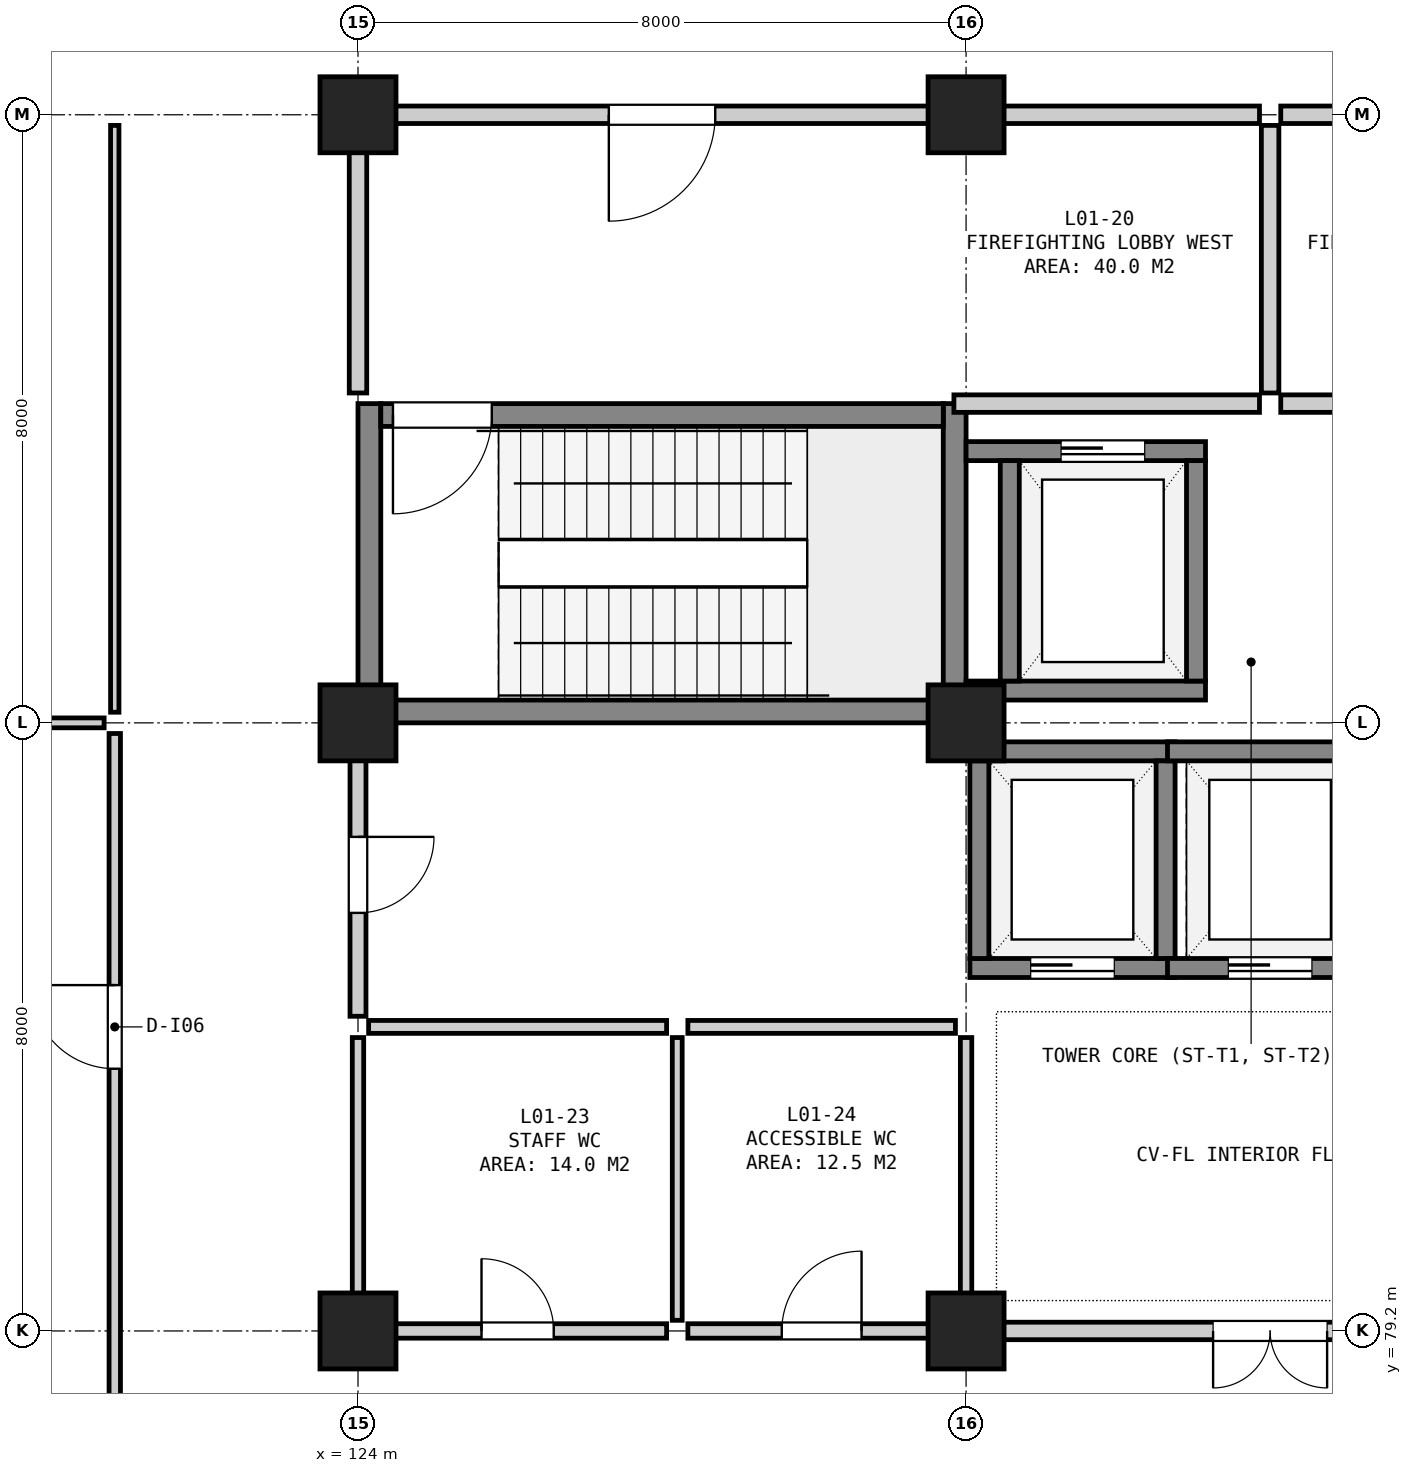
"""IFC4 building model, lengths in metres.
Left out: names, types, materials, properties, quantities, classifications, styles, units other than length and angle.
Written with IfcOpenShell. Run it as: python <this file> out.ifc"""

import sys

from ifc_helpers import new_model, si_unit, direction, frame, frame_2d, origin, origin_2d, place, context, subcontext, project, spatial, rectangle, extrude, element, fill, save


model = new_model("IFC4")
c1 = context("Model", 3, precision=1e-05, world=origin(), true_north=direction((0.0, 1.0)))
c2 = subcontext(c1, "Body", "Model", "MODEL_VIEW")
j1 = project(units=[si_unit("LENGTHUNIT", "METRE"), si_unit("PLANEANGLEUNIT", "RADIAN")], contexts=[c1])
p1 = place(None, origin())
s1 = spatial("IfcSite", under=j1, at=p1, CompositionType="ELEMENT")
p2 = place(p1, origin())
s2 = spatial("IfcBuilding", under=s1, at=p2, CompositionType="ELEMENT")
p3 = place(p2, frame((0.0, 0.0, 5.4)))
s3 = spatial("IfcBuildingStorey", under=s2, at=p3, CompositionType="ELEMENT", Elevation=5.4)
for number, where, z_axis, x_axis in (
    (1, (124.0, 79.2, 0.0), (0.0, 0.0, 1.0), (1.0, 0.0, 0.0)),
    (2, (124.0, 87.2, 0.0), (0.0, 0.0, 1.0), (1.0, 0.0, 0.0)),
    (3, (124.0, 95.2, 0.0), (0.0, 0.0, 1.0), (1.0, 0.0, 0.0)),
    (4, (132.0, 79.2, 0.0), (0.0, 0.0, 1.0), (1.0, 0.0, 0.0)),
    (5, (132.0, 87.2, 0.0), (0.0, 0.0, 1.0), (1.0, 0.0, 0.0)),
    (6, (132.0, 95.2, 0.0), (0.0, 0.0, 1.0), (1.0, 0.0, 0.0)),
):
    element("IfcColumn", number, at=place(p3, frame(where, z_axis=z_axis, x_axis=x_axis)), inside=s3, PredefinedType="COLUMN", context=c2, shape_type="SweptSolid", body=[
        extrude(rectangle(XDim=1.0, YDim=1.0, at=origin_2d()), origin(), (0.0, 0.0, 1.0), 5.4),
    ])
for number, where, z_axis, x_axis in (
    (7, (124.15, 87.2, 0.0), (0.0, 0.0, 1.0), (0.0, 1.0, 0.0)),
    (8, (131.85, 87.2, 0.0), (0.0, 0.0, 1.0), (0.0, 1.0, 0.0)),
):
    element("IfcWall", number, at=place(p3, frame(where, z_axis=z_axis, x_axis=x_axis)), inside=s3, PredefinedType="SHEAR", context=c2, shape_type="SweptSolid", body=[
        extrude(rectangle(XDim=4.2, YDim=0.3, at=frame_2d((2.1, 0.0))), origin(), (0.0, 0.0, 1.0), 5.1),
    ])
p4 = place(p3, frame((124.3, 87.35, 0.0), z_axis=(0.0, 0.0, 1.0), x_axis=(1.0, 0.0, 0.0)))
e9 = element("IfcWall", 9, at=p4, inside=s3, PredefinedType="SHEAR", context=c2, shape_type="SweptSolid", body=[
    extrude(rectangle(XDim=7.4, YDim=0.3, at=frame_2d((3.7, 0.0))), origin(), (0.0, 0.0, 1.0), 5.1),
])
p5 = place(p3, frame((124.3, 91.25, 0.0), z_axis=(0.0, 0.0, 1.0), x_axis=(1.0, 0.0, 0.0)))
e10 = element("IfcWall", 10, at=p5, inside=s3, PredefinedType="SHEAR", context=c2, shape_type="SweptSolid", body=[
    extrude(rectangle(XDim=7.4, YDim=0.3, at=frame_2d((3.7, 0.0))), origin(), (0.0, 0.0, 1.0), 5.1),
])
p6 = place(p5, frame((0.16, 0.0, 0.0)))
e11 = element("IfcOpeningElement", 11, at=p6, cuts=e10, PredefinedType="OPENING", context=c2, shape_type="SweptSolid", body=[
    extrude(rectangle(XDim=1.3, YDim=2.18, at=frame_2d((0.65, 1.09))), frame((0.0, 0.162, 0.0), z_axis=(0.0, -1.0, 0.0), x_axis=(1.0, 0.0, 0.0)), (0.0, 0.0, 1.0), 0.324),
])
p7 = place(p3, frame((132.0, 87.625, 0.0), z_axis=(0.0, 0.0, 1.0), x_axis=(1.0, 0.0, 0.0)))
e12 = element("IfcWall", 12, at=p7, inside=s3, PredefinedType="SHEAR", context=c2, shape_type="SweptSolid", body=[
    extrude(rectangle(XDim=3.15, YDim=0.25, at=frame_2d((1.575, 0.0))), origin(), (0.0, 0.0, 1.0), 5.1),
])
p8 = place(p3, frame((132.0, 90.775, 0.0), z_axis=(0.0, 0.0, 1.0), x_axis=(1.0, 0.0, 0.0)))
e13 = element("IfcWall", 13, at=p8, inside=s3, PredefinedType="SHEAR", context=c2, shape_type="SweptSolid", body=[
    extrude(rectangle(XDim=3.15, YDim=0.25, at=frame_2d((1.575, 0.0))), origin(), (0.0, 0.0, 1.0), 5.1),
])
p9 = place(p8, frame((1.25, 0.0, 0.0)))
e14 = element("IfcOpeningElement", 14, at=p9, cuts=e13, PredefinedType="OPENING", context=c2, shape_type="SweptSolid", body=[
    extrude(rectangle(XDim=1.1, YDim=2.15, at=frame_2d((0.55, 1.075))), frame((0.0, 0.137, 0.0), z_axis=(0.0, -1.0, 0.0), x_axis=(1.0, 0.0, 0.0)), (0.0, 0.0, 1.0), 0.274),
])
for number, where, z_axis, x_axis in (
    (15, (132.575, 87.75, 0.0), (0.0, 0.0, 1.0), (0.0, 1.0, 0.0)),
    (16, (135.025, 87.75, 0.0), (0.0, 0.0, 1.0), (0.0, 1.0, 0.0)),
):
    element("IfcWall", number, at=place(p3, frame(where, z_axis=z_axis, x_axis=x_axis)), inside=s3, PredefinedType="SHEAR", context=c2, shape_type="SweptSolid", body=[
        extrude(rectangle(XDim=2.9, YDim=0.25, at=frame_2d((1.45, 0.0))), origin(), (0.0, 0.0, 1.0), 5.1),
    ])
p10 = place(p3, frame((132.05, 83.975, 0.0), z_axis=(0.0, 0.0, 1.0), x_axis=(1.0, 0.0, 0.0)))
e17 = element("IfcWall", 17, at=p10, inside=s3, PredefinedType="SHEAR", context=c2, shape_type="SweptSolid", body=[
    extrude(rectangle(XDim=2.7, YDim=0.25, at=frame_2d((1.35, 0.0))), origin(), (0.0, 0.0, 1.0), 5.1),
])
p11 = place(p10, frame((0.8, 0.0, 0.0)))
e18 = element("IfcOpeningElement", 18, at=p11, cuts=e17, PredefinedType="OPENING", context=c2, shape_type="SweptSolid", body=[
    extrude(rectangle(XDim=1.1, YDim=2.15, at=frame_2d((0.55, 1.075))), frame((0.0, 0.137, 0.0), z_axis=(0.0, -1.0, 0.0), x_axis=(1.0, 0.0, 0.0)), (0.0, 0.0, 1.0), 0.274),
])
p12 = place(p3, frame((132.05, 86.825, 0.0), z_axis=(0.0, 0.0, 1.0), x_axis=(1.0, 0.0, 0.0)))
e19 = element("IfcWall", 19, at=p12, inside=s3, PredefinedType="SHEAR", context=c2, shape_type="SweptSolid", body=[
    extrude(rectangle(XDim=2.7, YDim=0.25, at=frame_2d((1.35, 0.0))), origin(), (0.0, 0.0, 1.0), 5.1),
])
for number, where, z_axis, x_axis in (
    (20, (132.175, 84.1, 0.0), (0.0, 0.0, 1.0), (0.0, 1.0, 0.0)),
    (21, (134.625, 84.1, 0.0), (0.0, 0.0, 1.0), (0.0, 1.0, 0.0)),
):
    element("IfcWall", number, at=place(p3, frame(where, z_axis=z_axis, x_axis=x_axis)), inside=s3, PredefinedType="SHEAR", context=c2, shape_type="SweptSolid", body=[
        extrude(rectangle(XDim=2.6, YDim=0.25, at=frame_2d((1.3, 0.0))), origin(), (0.0, 0.0, 1.0), 5.1),
    ])
p13 = place(p3, frame((134.65, 83.975, 0.0), z_axis=(0.0, 0.0, 1.0), x_axis=(1.0, 0.0, 0.0)))
e22 = element("IfcWall", 22, at=p13, inside=s3, PredefinedType="SHEAR", context=c2, shape_type="SweptSolid", body=[
    extrude(rectangle(XDim=2.7, YDim=0.25, at=frame_2d((1.35, 0.0))), origin(), (0.0, 0.0, 1.0), 5.1),
])
p14 = place(p13, frame((0.8, 0.0, 0.0)))
e23 = element("IfcOpeningElement", 23, at=p14, cuts=e22, PredefinedType="OPENING", context=c2, shape_type="SweptSolid", body=[
    extrude(rectangle(XDim=1.1, YDim=2.15, at=frame_2d((0.55, 1.075))), frame((0.0, 0.137, 0.0), z_axis=(0.0, -1.0, 0.0), x_axis=(1.0, 0.0, 0.0)), (0.0, 0.0, 1.0), 0.274),
])
p15 = place(p3, frame((134.65, 86.825, 0.0), z_axis=(0.0, 0.0, 1.0), x_axis=(1.0, 0.0, 0.0)))
e24 = element("IfcWall", 24, at=p15, inside=s3, PredefinedType="SHEAR", context=c2, shape_type="SweptSolid", body=[
    extrude(rectangle(XDim=2.7, YDim=0.25, at=frame_2d((1.35, 0.0))), origin(), (0.0, 0.0, 1.0), 5.1),
])
p16 = place(p3, frame((131.84, 91.4, 0.0), z_axis=(0.0, 0.0, 1.0), x_axis=(1.0, 0.0, 0.0)))
e25 = element("IfcWall", 25, at=p16, inside=s3, PredefinedType="SOLIDWALL", context=c2, shape_type="SweptSolid", body=[
    extrude(rectangle(XDim=4.02, YDim=0.23, at=frame_2d((2.01, 0.0))), origin(), (0.0, 0.0, 1.0), 5.1),
])
p17 = place(p3, frame((124.14, 95.2, 0.0), z_axis=(0.0, 0.0, 1.0), x_axis=(1.0, 0.0, 0.0)))
e26 = element("IfcWall", 26, at=p17, inside=s3, PredefinedType="SOLIDWALL", context=c2, shape_type="SweptSolid", body=[
    extrude(rectangle(XDim=11.72, YDim=0.23, at=frame_2d((5.86, 0.0))), origin(), (0.0, 0.0, 1.0), 4.535),
])
p18 = place(p17, frame((3.16, 0.0, 0.0)))
e27 = element("IfcOpeningElement", 27, at=p18, cuts=e26, PredefinedType="OPENING", context=c2, shape_type="SweptSolid", body=[
    extrude(rectangle(XDim=1.4, YDim=2.2, at=frame_2d((0.7, 1.1))), frame((0.0, 0.127, 0.0), z_axis=(0.0, -1.0, 0.0), x_axis=(1.0, 0.0, 0.0)), (0.0, 0.0, 1.0), 0.254),
])
p19 = place(p3, frame((124.0, 91.54, 0.0), z_axis=(0.0, 0.0, 1.0), x_axis=(0.0, 1.0, 0.0)))
e28 = element("IfcWall", 28, at=p19, inside=s3, PredefinedType="SOLIDWALL", context=c2, shape_type="SweptSolid", body=[
    extrude(rectangle(XDim=3.52, YDim=0.23, at=frame_2d((1.76, 0.0))), origin(), (0.0, 0.0, 1.0), 4.585),
])
p20 = place(p3, frame((136.0, 91.54, 0.0), z_axis=(0.0, 0.0, 1.0), x_axis=(0.0, 1.0, 0.0)))
e29 = element("IfcWall", 29, at=p20, inside=s3, PredefinedType="SOLIDWALL", context=c2, shape_type="SweptSolid", body=[
    extrude(rectangle(XDim=3.52, YDim=0.23, at=frame_2d((1.76, 0.0))), origin(), (0.0, 0.0, 1.0), 5.1),
])
p21 = place(p3, frame((136.14, 91.4, 0.0), z_axis=(0.0, 0.0, 1.0), x_axis=(1.0, 0.0, 0.0)))
e30 = element("IfcWall", 30, at=p21, inside=s3, PredefinedType="SOLIDWALL", context=c2, shape_type="SweptSolid", body=[
    extrude(rectangle(XDim=4.02, YDim=0.23, at=frame_2d((2.01, 0.0))), origin(), (0.0, 0.0, 1.0), 5.1),
])
p22 = place(p3, frame((136.14, 95.2, 0.0), z_axis=(0.0, 0.0, 1.0), x_axis=(1.0, 0.0, 0.0)))
e31 = element("IfcWall", 31, at=p22, inside=s3, PredefinedType="SOLIDWALL", context=c2, shape_type="SweptSolid", body=[
    extrude(rectangle(XDim=11.72, YDim=0.23, at=frame_2d((5.86, 0.0))), origin(), (0.0, 0.0, 1.0), 4.535),
])
p23 = place(p22, frame((7.16, 0.0, 0.0)))
e32 = element("IfcOpeningElement", 32, at=p23, cuts=e31, PredefinedType="OPENING", context=c2, shape_type="SweptSolid", body=[
    extrude(rectangle(XDim=1.4, YDim=2.2, at=frame_2d((0.7, 1.1))), frame((0.0, 0.127, 0.0), z_axis=(0.0, -1.0, 0.0), x_axis=(1.0, 0.0, 0.0)), (0.0, 0.0, 1.0), 0.254),
])
p24 = place(p3, frame((124.14, 79.2, 0.0), z_axis=(0.0, 0.0, 1.0), x_axis=(1.0, 0.0, 0.0)))
e33 = element("IfcWall", 33, at=p24, inside=s3, PredefinedType="PARTITIONING", context=c2, shape_type="SweptSolid", body=[
    extrude(rectangle(XDim=3.92, YDim=0.19, at=frame_2d((1.96, 0.0))), origin(), (0.0, 0.0, 1.0), 4.435),
])
p25 = place(p24, frame((1.485, 0.0, 0.0)))
e34 = element("IfcOpeningElement", 34, at=p25, cuts=e33, PredefinedType="OPENING", context=c2, shape_type="SweptSolid", body=[
    extrude(rectangle(XDim=0.95, YDim=2.15, at=frame_2d((0.475, 1.075))), frame((0.0, 0.107, 0.0), z_axis=(0.0, -1.0, 0.0), x_axis=(1.0, 0.0, 0.0)), (0.0, 0.0, 1.0), 0.214),
])
p26 = place(p3, frame((124.14, 83.2, 0.0), z_axis=(0.0, 0.0, 1.0), x_axis=(1.0, 0.0, 0.0)))
e35 = element("IfcWall", 35, at=p26, inside=s3, PredefinedType="PARTITIONING", context=c2, shape_type="SweptSolid", body=[
    extrude(rectangle(XDim=3.92, YDim=0.17, at=frame_2d((1.96, 0.0))), origin(), (0.0, 0.0, 1.0), 5.1),
])
p27 = place(p3, frame((124.0, 79.34, 0.0), z_axis=(0.0, 0.0, 1.0), x_axis=(0.0, 1.0, 0.0)))
e36 = element("IfcWall", 36, at=p27, inside=s3, PredefinedType="PARTITIONING", context=c2, shape_type="SweptSolid", body=[
    extrude(rectangle(XDim=3.72, YDim=0.15, at=frame_2d((1.86, 0.0))), origin(), (0.0, 0.0, 1.0), 4.535),
])
p28 = place(p3, frame((128.2, 79.34, 0.0), z_axis=(0.0, 0.0, 1.0), x_axis=(0.0, 1.0, 0.0)))
e37 = element("IfcWall", 37, at=p28, inside=s3, PredefinedType="PARTITIONING", context=c2, shape_type="SweptSolid", body=[
    extrude(rectangle(XDim=3.72, YDim=0.13, at=frame_2d((1.86, 0.0))), origin(), (0.0, 0.0, 1.0), 5.1),
])
p29 = place(p3, frame((128.34, 79.2, 0.0), z_axis=(0.0, 0.0, 1.0), x_axis=(1.0, 0.0, 0.0)))
e38 = element("IfcWall", 38, at=p29, inside=s3, PredefinedType="PARTITIONING", context=c2, shape_type="SweptSolid", body=[
    extrude(rectangle(XDim=3.52, YDim=0.19, at=frame_2d((1.76, 0.0))), origin(), (0.0, 0.0, 1.0), 4.435),
])
p30 = place(p29, frame((1.235, 0.0, 0.0)))
e39 = element("IfcOpeningElement", 39, at=p30, cuts=e38, PredefinedType="OPENING", context=c2, shape_type="SweptSolid", body=[
    extrude(rectangle(XDim=1.05, YDim=2.15, at=frame_2d((0.525, 1.075))), frame((0.0, 0.107, 0.0), z_axis=(0.0, -1.0, 0.0), x_axis=(1.0, 0.0, 0.0)), (0.0, 0.0, 1.0), 0.214),
])
p31 = place(p3, frame((128.34, 83.2, 0.0), z_axis=(0.0, 0.0, 1.0), x_axis=(1.0, 0.0, 0.0)))
e40 = element("IfcWall", 40, at=p31, inside=s3, PredefinedType="PARTITIONING", context=c2, shape_type="SweptSolid", body=[
    extrude(rectangle(XDim=3.52, YDim=0.17, at=frame_2d((1.76, 0.0))), origin(), (0.0, 0.0, 1.0), 5.1),
])
p32 = place(p3, frame((132.0, 79.34, 0.0), z_axis=(0.0, 0.0, 1.0), x_axis=(0.0, 1.0, 0.0)))
e41 = element("IfcWall", 41, at=p32, inside=s3, PredefinedType="PARTITIONING", context=c2, shape_type="SweptSolid", body=[
    extrude(rectangle(XDim=3.72, YDim=0.15, at=frame_2d((1.86, 0.0))), origin(), (0.0, 0.0, 1.0), 4.485),
])
p33 = place(p3, frame((124.0, 83.34, 0.0), z_axis=(0.0, 0.0, 1.0), x_axis=(0.0, 1.0, 0.0)))
e42 = element("IfcWall", 42, at=p33, inside=s3, PredefinedType="SOLIDWALL", context=c2, shape_type="SweptSolid", body=[
    extrude(rectangle(XDim=3.72, YDim=0.21, at=frame_2d((1.86, 0.0))), origin(), (0.0, 0.0, 1.0), 4.535),
])
p34 = place(p33, frame((1.36, 0.0, 0.0)))
e43 = element("IfcOpeningElement", 43, at=p34, cuts=e42, PredefinedType="OPENING", context=c2, shape_type="SweptSolid", body=[
    extrude(rectangle(XDim=1.0, YDim=2.15, at=frame_2d((0.5, 1.075))), frame((0.0, 0.117, 0.0), z_axis=(0.0, -1.0, 0.0), x_axis=(1.0, 0.0, 0.0)), (0.0, 0.0, 1.0), 0.234),
])
p35 = place(p3, frame((132.14, 79.2, 0.0), z_axis=(0.0, 0.0, 1.0), x_axis=(1.0, 0.0, 0.0)))
e44 = element("IfcWall", 44, at=p35, inside=s3, PredefinedType="SOLIDWALL", context=c2, shape_type="SweptSolid", body=[
    extrude(rectangle(XDim=7.72, YDim=0.23, at=frame_2d((3.86, 0.0))), origin(), (0.0, 0.0, 1.0), 4.485),
])
p36 = place(p35, frame((3.11, 0.0, 0.0)))
e45 = element("IfcOpeningElement", 45, at=p36, cuts=e44, PredefinedType="OPENING", context=c2, shape_type="SweptSolid", body=[
    extrude(rectangle(XDim=1.5, YDim=2.2, at=frame_2d((0.75, 1.1))), frame((0.0, 0.127, 0.0), z_axis=(0.0, -1.0, 0.0), x_axis=(1.0, 0.0, 0.0)), (0.0, 0.0, 1.0), 0.254),
])
p37 = place(p3, frame((102.24, 87.2, 0.0), z_axis=(0.0, 0.0, 1.0), x_axis=(1.0, 0.0, 0.0)))
e46 = element("IfcWall", 46, at=p37, inside=s3, PredefinedType="PARTITIONING", context=c2, shape_type="SweptSolid", body=[
    extrude(rectangle(XDim=18.42, YDim=0.13, at=frame_2d((9.21, 0.0))), origin(), (0.0, 0.0, 1.0), 4.435),
])
p38 = place(p37, frame((12.21, 0.0, 0.0)))
e47 = element("IfcOpeningElement", 47, at=p38, cuts=e46, PredefinedType="OPENING", context=c2, shape_type="SweptSolid", body=[
    extrude(rectangle(XDim=1.5, YDim=2.2, at=frame_2d((0.75, 1.1))), frame((0.0, 0.077, 0.0), z_axis=(0.0, -1.0, 0.0), x_axis=(1.0, 0.0, 0.0)), (0.0, 0.0, 1.0), 0.154),
])
p39 = place(p3, frame((120.8, 87.34, 0.0), z_axis=(0.0, 0.0, 1.0), x_axis=(0.0, 1.0, 0.0)))
e48 = element("IfcWall", 48, at=p39, inside=s3, PredefinedType="PARTITIONING", context=c2, shape_type="SweptSolid", body=[
    extrude(rectangle(XDim=7.72, YDim=0.11, at=frame_2d((3.86, 0.0))), origin(), (0.0, 0.0, 1.0), 5.1),
])
p40 = place(p3, frame((120.8, 72.14, 0.0), z_axis=(0.0, 0.0, 1.0), x_axis=(0.0, 1.0, 0.0)))
e49 = element("IfcWall", 49, at=p40, inside=s3, PredefinedType="PARTITIONING", context=c2, shape_type="SweptSolid", body=[
    extrude(rectangle(XDim=14.92, YDim=0.15, at=frame_2d((7.46, 0.0))), origin(), (0.0, 0.0, 1.0), 5.1),
])
p41 = place(p40, frame((10.51, 0.0, 0.0)))
e50 = element("IfcOpeningElement", 50, at=p41, cuts=e49, PredefinedType="OPENING", context=c2, shape_type="SweptSolid", body=[
    extrude(rectangle(XDim=1.1, YDim=2.15, at=frame_2d((0.55, 1.075))), frame((0.0, 0.087, 0.0), z_axis=(0.0, -1.0, 0.0), x_axis=(1.0, 0.0, 0.0)), (0.0, 0.0, 1.0), 0.174),
])
p42 = place(p6, frame((1.3, 0.0, 0.0), z_axis=(0.0, 0.0, 1.0), x_axis=(-1.0, 0.0, 0.0)))
e51 = element("IfcDoor", 51, at=p42, inside=s3, OperationType="SINGLE_SWING_RIGHT", PredefinedType="DOOR", context=c2, shape_type="SweptSolid", body=[
    extrude(rectangle(XDim=1.3, YDim=2.18, at=frame_2d((0.65, 1.09))), frame((0.0, 0.025, 0.0), z_axis=(0.0, -1.0, 0.0), x_axis=(1.0, 0.0, 0.0)), (0.0, 0.0, 1.0), 0.05),
])
fill(e11, e51)
p43 = place(p9, origin())
e52 = element("IfcDoor", 52, at=p43, inside=s3, OperationType="SLIDING_TO_LEFT", PredefinedType="DOOR", context=c2, shape_type="SweptSolid", body=[
    extrude(rectangle(XDim=1.1, YDim=2.15, at=frame_2d((0.55, 1.075))), frame((0.0, 0.025, 0.0), z_axis=(0.0, -1.0, 0.0), x_axis=(1.0, 0.0, 0.0)), (0.0, 0.0, 1.0), 0.05),
])
fill(e14, e52)
p44 = place(p11, origin())
e53 = element("IfcDoor", 53, at=p44, inside=s3, OperationType="SLIDING_TO_LEFT", PredefinedType="DOOR", context=c2, shape_type="SweptSolid", body=[
    extrude(rectangle(XDim=1.1, YDim=2.15, at=frame_2d((0.55, 1.075))), frame((0.0, 0.025, 0.0), z_axis=(0.0, -1.0, 0.0), x_axis=(1.0, 0.0, 0.0)), (0.0, 0.0, 1.0), 0.05),
])
fill(e18, e53)
p45 = place(p14, origin())
e54 = element("IfcDoor", 54, at=p45, inside=s3, OperationType="SLIDING_TO_LEFT", PredefinedType="DOOR", context=c2, shape_type="SweptSolid", body=[
    extrude(rectangle(XDim=1.1, YDim=2.15, at=frame_2d((0.55, 1.075))), frame((0.0, 0.025, 0.0), z_axis=(0.0, -1.0, 0.0), x_axis=(1.0, 0.0, 0.0)), (0.0, 0.0, 1.0), 0.05),
])
fill(e23, e54)
p46 = place(p18, frame((1.4, 0.0, 0.0), z_axis=(0.0, 0.0, 1.0), x_axis=(-1.0, 0.0, 0.0)))
e55 = element("IfcDoor", 55, at=p46, inside=s3, OperationType="SINGLE_SWING_RIGHT", PredefinedType="DOOR", context=c2, shape_type="SweptSolid", body=[
    extrude(rectangle(XDim=1.4, YDim=2.2, at=frame_2d((0.7, 1.1))), frame((0.0, 0.025, 0.0), z_axis=(0.0, -1.0, 0.0), x_axis=(1.0, 0.0, 0.0)), (0.0, 0.0, 1.0), 0.05),
])
fill(e27, e55)
p47 = place(p25, origin())
e56 = element("IfcDoor", 56, at=p47, inside=s3, OperationType="SINGLE_SWING_LEFT", PredefinedType="DOOR", context=c2, shape_type="SweptSolid", body=[
    extrude(rectangle(XDim=0.95, YDim=2.15, at=frame_2d((0.475, 1.075))), frame((0.0, 0.025, 0.0), z_axis=(0.0, -1.0, 0.0), x_axis=(1.0, 0.0, 0.0)), (0.0, 0.0, 1.0), 0.05),
])
fill(e34, e56)
p48 = place(p30, origin())
e57 = element("IfcDoor", 57, at=p48, inside=s3, OperationType="SINGLE_SWING_RIGHT", PredefinedType="DOOR", context=c2, shape_type="SweptSolid", body=[
    extrude(rectangle(XDim=1.05, YDim=2.15, at=frame_2d((0.525, 1.075))), frame((0.0, 0.025, 0.0), z_axis=(0.0, -1.0, 0.0), x_axis=(1.0, 0.0, 0.0)), (0.0, 0.0, 1.0), 0.05),
])
fill(e39, e57)
p49 = place(p34, frame((1.0, 0.0, 0.0), z_axis=(0.0, 0.0, 1.0), x_axis=(-1.0, 0.0, 0.0)))
e58 = element("IfcDoor", 58, at=p49, inside=s3, OperationType="SINGLE_SWING_LEFT", PredefinedType="DOOR", context=c2, shape_type="SweptSolid", body=[
    extrude(rectangle(XDim=1.0, YDim=2.15, at=frame_2d((0.5, 1.075))), frame((0.0, 0.025, 0.0), z_axis=(0.0, -1.0, 0.0), x_axis=(1.0, 0.0, 0.0)), (0.0, 0.0, 1.0), 0.05),
])
fill(e43, e58)
p50 = place(p36, frame((1.5, 0.0, 0.0), z_axis=(0.0, 0.0, 1.0), x_axis=(-1.0, 0.0, 0.0)))
e59 = element("IfcDoor", 59, at=p50, inside=s3, OperationType="DOUBLE_DOOR_SINGLE_SWING", PredefinedType="DOOR", context=c2, shape_type="SweptSolid", body=[
    extrude(rectangle(XDim=1.5, YDim=2.2, at=frame_2d((0.75, 1.1))), frame((0.0, 0.025, 0.0), z_axis=(0.0, -1.0, 0.0), x_axis=(1.0, 0.0, 0.0)), (0.0, 0.0, 1.0), 0.05),
])
fill(e45, e59)
p51 = place(p41, origin())
e60 = element("IfcDoor", 60, at=p51, inside=s3, OperationType="SINGLE_SWING_RIGHT", PredefinedType="DOOR", context=c2, shape_type="SweptSolid", body=[
    extrude(rectangle(XDim=1.1, YDim=2.15, at=frame_2d((0.55, 1.075))), frame((0.0, 0.025, 0.0), z_axis=(0.0, -1.0, 0.0), x_axis=(1.0, 0.0, 0.0)), (0.0, 0.0, 1.0), 0.05),
])
fill(e50, e60)
save(model, sys.argv[1])
